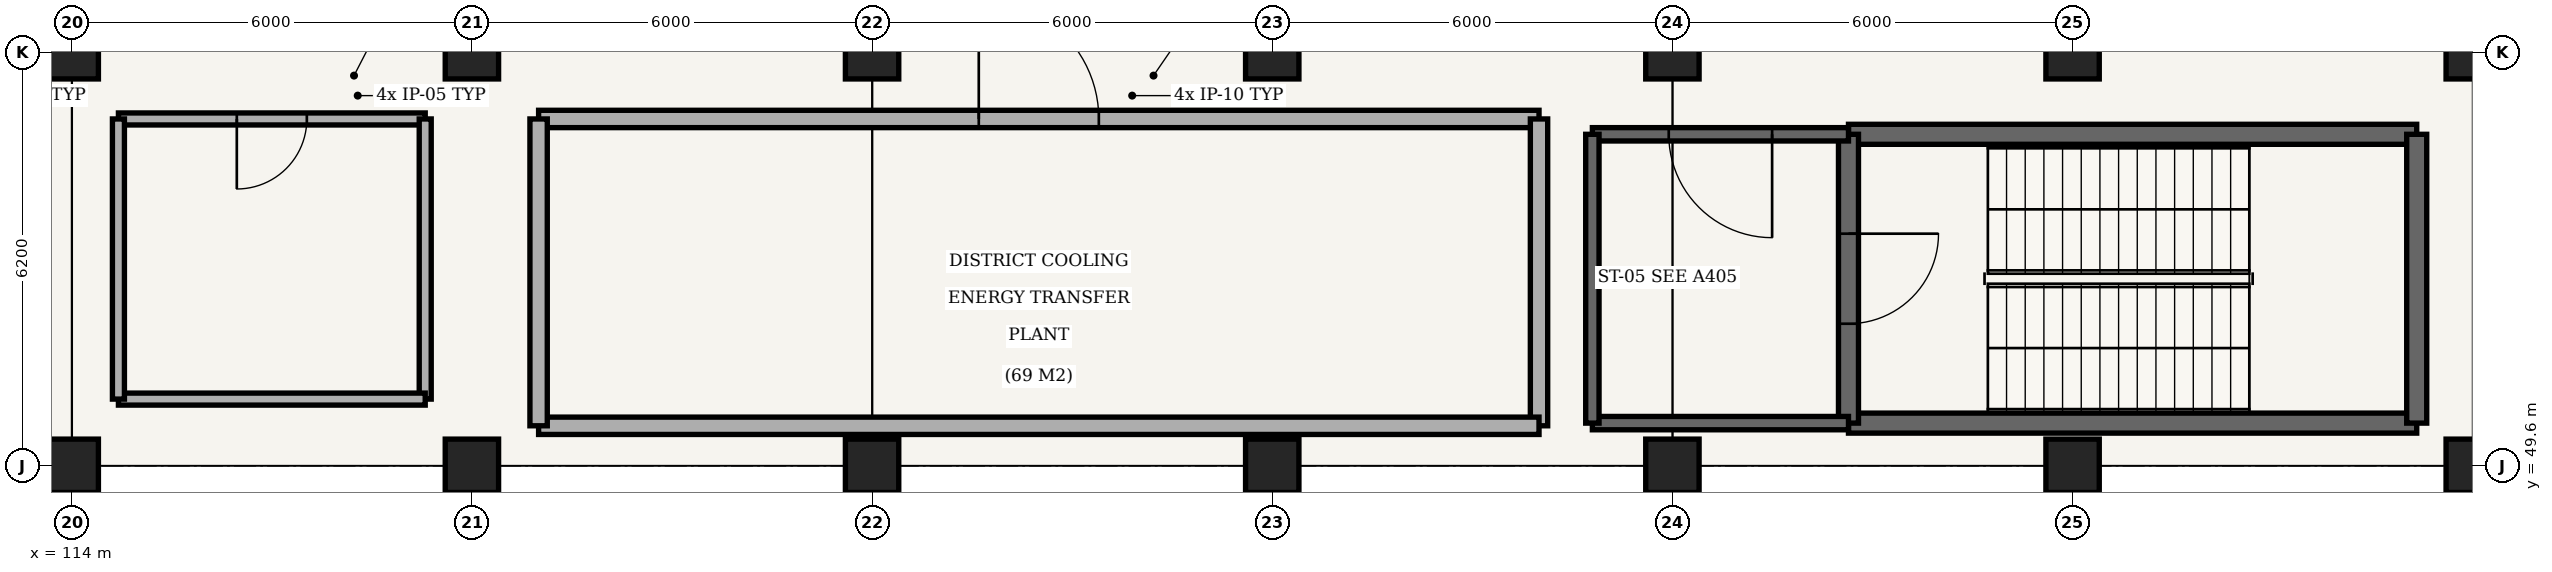
"""IFC4 building model, lengths in metres.
Left out: names, types, materials, properties, quantities, classifications, styles, units other than length and angle.
Written with IfcOpenShell. Run it as: python <this file> out.ifc"""

import sys

from ifc_helpers import new_model, si_unit, direction, frame, frame_2d, origin, origin_2d, place, context, subcontext, project, spatial, rectangle, hollow_circle, extrude, element, fill, save


model = new_model("IFC4")
c1 = context("Model", 3, precision=1e-05, world=origin(), true_north=direction((0.0, 1.0)))
c2 = subcontext(c1, "Body", "Model", "MODEL_VIEW")
j1 = project(units=[si_unit("LENGTHUNIT", "METRE"), si_unit("PLANEANGLEUNIT", "RADIAN")], contexts=[c1])
p1 = place(None, origin())
s1 = spatial("IfcSite", under=j1, at=p1, CompositionType="ELEMENT")
p2 = place(p1, origin())
s2 = spatial("IfcBuilding", under=s1, at=p2, CompositionType="ELEMENT")
p3 = place(p2, frame((0.0, 0.0, -5.4)))
s3 = spatial("IfcBuildingStorey", under=s2, at=p3, CompositionType="ELEMENT", Elevation=-5.4)
for number, where, z_axis, x_axis in (
    (1, (114.0, 49.6, -0.4), (0.0, 0.0, 1.0), (1.0, 0.0, 0.0)),
    (2, (114.0, 55.8, -0.4), (0.0, 0.0, 1.0), (1.0, 0.0, 0.0)),
    (3, (120.0, 49.6, -0.4), (0.0, 0.0, 1.0), (1.0, 0.0, 0.0)),
    (4, (120.0, 55.8, -0.4), (0.0, 0.0, 1.0), (1.0, 0.0, 0.0)),
    (5, (126.0, 49.6, -0.4), (0.0, 0.0, 1.0), (1.0, 0.0, 0.0)),
    (6, (126.0, 55.8, -0.4), (0.0, 0.0, 1.0), (1.0, 0.0, 0.0)),
    (7, (132.0, 49.6, -0.4), (0.0, 0.0, 1.0), (1.0, 0.0, 0.0)),
    (8, (132.0, 55.8, -0.4), (0.0, 0.0, 1.0), (1.0, 0.0, 0.0)),
    (9, (138.0, 49.6, -0.4), (0.0, 0.0, 1.0), (1.0, 0.0, 0.0)),
    (10, (138.0, 55.8, -0.4), (0.0, 0.0, 1.0), (1.0, 0.0, 0.0)),
    (11, (144.0, 49.6, -0.4), (0.0, 0.0, 1.0), (1.0, 0.0, 0.0)),
    (12, (144.0, 55.8, -0.4), (0.0, 0.0, 1.0), (1.0, 0.0, 0.0)),
    (13, (150.0, 49.6, -0.4), (0.0, 0.0, 1.0), (1.0, 0.0, 0.0)),
    (14, (150.0, 55.8, -0.4), (0.0, 0.0, 1.0), (1.0, 0.0, 0.0)),
):
    element("IfcColumn", number, at=place(p3, frame(where, z_axis=z_axis, x_axis=x_axis)), inside=s3, PredefinedType="COLUMN", context=c2, shape_type="SweptSolid", body=[
        extrude(rectangle(XDim=0.8, YDim=0.8, at=origin_2d()), origin(), (0.0, 0.0, 1.0), 5.8),
    ])
for number, where, z_axis, x_axis in (
    (15, (140.64, 50.24, -0.4), (0.0, 0.0, 1.0), (1.0, 0.0, 0.0)),
    (16, (149.16, 54.57, -0.4), (0.0, 0.0, 1.0), (-1.0, 0.0, 0.0)),
):
    element("IfcWall", number, at=place(p3, frame(where, z_axis=z_axis, x_axis=x_axis)), inside=s3, PredefinedType="SHEAR", context=c2, shape_type="SweptSolid", body=[
        extrude(rectangle(XDim=8.52, YDim=0.3, at=frame_2d((4.26, 0.0))), origin(), (0.0, 0.0, 1.0), 5.5),
    ])
p4 = place(p3, frame((140.64, 54.57, -0.4), z_axis=(0.0, 0.0, 1.0), x_axis=(0.0, -1.0, 0.0)))
e17 = element("IfcWall", 17, at=p4, inside=s3, PredefinedType="SHEAR", context=c2, shape_type="SweptSolid", body=[
    extrude(rectangle(XDim=4.33, YDim=0.3, at=frame_2d((2.165, 0.0))), origin(), (0.0, 0.0, 1.0), 5.5),
])
p5 = place(p4, frame((1.49, 0.0, 0.4)))
e18 = element("IfcOpeningElement", 18, at=p5, cuts=e17, PredefinedType="OPENING", context=c2, shape_type="SweptSolid", body=[
    extrude(rectangle(XDim=1.35, YDim=2.2, at=frame_2d((0.675, 1.1))), frame((0.0, 0.16, 0.0), z_axis=(0.0, -1.0, 0.0), x_axis=(1.0, 0.0, 0.0)), (0.0, 0.0, 1.0), 0.32),
])
p6 = place(p3, frame((149.16, 50.24, -0.4), z_axis=(0.0, 0.0, 1.0), x_axis=(0.0, 1.0, 0.0)))
e19 = element("IfcWall", 19, at=p6, inside=s3, PredefinedType="SHEAR", context=c2, shape_type="SweptSolid", body=[
    extrude(rectangle(XDim=4.33, YDim=0.3, at=frame_2d((2.165, 0.0))), origin(), (0.0, 0.0, 1.0), 5.5),
])
p7 = place(p3, frame((136.8, 50.24, 0.0), z_axis=(0.0, 0.0, 1.0), x_axis=(1.0, 0.0, 0.0)))
e20 = element("IfcWall", 20, at=p7, inside=s3, PredefinedType="SHEAR", context=c2, shape_type="SweptSolid", body=[
    extrude(rectangle(XDim=3.84, YDim=0.2, at=frame_2d((1.92, 0.0))), origin(), (0.0, 0.0, 1.0), 5.1),
])
p8 = place(p3, frame((140.64, 54.57, 0.0), z_axis=(0.0, 0.0, 1.0), x_axis=(-1.0, 0.0, 0.0)))
e21 = element("IfcWall", 21, at=p8, inside=s3, PredefinedType="SHEAR", context=c2, shape_type="SweptSolid", body=[
    extrude(rectangle(XDim=3.84, YDim=0.2, at=frame_2d((1.92, 0.0))), origin(), (0.0, 0.0, 1.0), 5.1),
])
p9 = place(p8, frame((1.145, 0.0, 0.0)))
e22 = element("IfcOpeningElement", 22, at=p9, cuts=e21, PredefinedType="OPENING", context=c2, shape_type="SweptSolid", body=[
    extrude(rectangle(XDim=1.55, YDim=2.2, at=frame_2d((0.775, 1.1))), frame((0.0, 0.11, 0.0), z_axis=(0.0, -1.0, 0.0), x_axis=(1.0, 0.0, 0.0)), (0.0, 0.0, 1.0), 0.22),
])
p10 = place(p3, frame((136.8, 54.57, 0.0), z_axis=(0.0, 0.0, 1.0), x_axis=(0.0, -1.0, 0.0)))
e23 = element("IfcWall", 23, at=p10, inside=s3, PredefinedType="SHEAR", context=c2, shape_type="SweptSolid", body=[
    extrude(rectangle(XDim=4.33, YDim=0.2, at=frame_2d((2.165, 0.0))), origin(), (0.0, 0.0, 1.0), 5.1),
])
p11 = place(p2, origin())
s4 = spatial("IfcBuildingStorey", under=s2, at=p11, CompositionType="ELEMENT", Elevation=0.0)
for number, where, z_axis, x_axis in (
    (24, (116.125, 55.35, -5.8), (0.0, 0.0, 1.0), (1.0, 0.0, 0.0)),
    (25, (117.875, 55.35, -5.8), (0.0, 0.0, 1.0), (1.0, 0.0, 0.0)),
):
    element("IfcColumn", number, at=place(p11, frame(where, z_axis=z_axis, x_axis=x_axis)), inside=s4, PredefinedType="COLUMN", context=c2, shape_type="SweptSolid", body=[
        extrude(hollow_circle(Radius=0.11, WallThickness=0.01, at=origin_2d()), origin(), (0.0, 0.0, 1.0), 8.3),
    ])
p12 = place(p3, frame((114.7, 54.8, 0.0), z_axis=(0.0, 0.0, 1.0), x_axis=(1.0, 0.0, 0.0)))
e26 = element("IfcWall", 26, at=p12, inside=s3, PredefinedType="PARTITIONING", context=c2, shape_type="SweptSolid", body=[
    extrude(rectangle(XDim=4.6, YDim=0.18, at=frame_2d((2.3, 0.0))), origin(), (0.0, 0.0, 1.0), 4.0),
])
p13 = place(p12, frame((1.775, 0.0, 0.0)))
e27 = element("IfcOpeningElement", 27, at=p13, cuts=e26, PredefinedType="OPENING", context=c2, shape_type="SweptSolid", body=[
    extrude(rectangle(XDim=1.05, YDim=2.1, at=frame_2d((0.525, 1.05))), frame((0.0, 0.1, 0.0), z_axis=(0.0, -1.0, 0.0), x_axis=(1.0, 0.0, 0.0)), (0.0, 0.0, 1.0), 0.2),
])
p14 = place(p3, frame((119.3, 54.8, 0.0), z_axis=(0.0, 0.0, 1.0), x_axis=(0.0, -1.0, 0.0)))
e28 = element("IfcWall", 28, at=p14, inside=s3, PredefinedType="PARTITIONING", context=c2, shape_type="SweptSolid", body=[
    extrude(rectangle(XDim=4.2, YDim=0.18, at=frame_2d((2.1, 0.0))), origin(), (0.0, 0.0, 1.0), 4.0),
])
p15 = place(p3, frame((119.3, 50.6, 0.0), z_axis=(0.0, 0.0, 1.0), x_axis=(-1.0, 0.0, 0.0)))
e29 = element("IfcWall", 29, at=p15, inside=s3, PredefinedType="PARTITIONING", context=c2, shape_type="SweptSolid", body=[
    extrude(rectangle(XDim=4.6, YDim=0.18, at=frame_2d((2.3, 0.0))), origin(), (0.0, 0.0, 1.0), 4.0),
])
p16 = place(p3, frame((114.7, 50.6, 0.0), z_axis=(0.0, 0.0, 1.0), x_axis=(0.0, 1.0, 0.0)))
e30 = element("IfcWall", 30, at=p16, inside=s3, PredefinedType="PARTITIONING", context=c2, shape_type="SweptSolid", body=[
    extrude(rectangle(XDim=4.2, YDim=0.18, at=frame_2d((2.1, 0.0))), origin(), (0.0, 0.0, 1.0), 4.0),
])
p17 = place(p3, frame((121.0, 54.8, 0.0), z_axis=(0.0, 0.0, 1.0), x_axis=(1.0, 0.0, 0.0)))
e31 = element("IfcWall", 31, at=p17, inside=s3, PredefinedType="PARTITIONING", context=c2, shape_type="SweptSolid", body=[
    extrude(rectangle(XDim=15.0, YDim=0.26, at=frame_2d((7.5, 0.0))), origin(), (0.0, 0.0, 1.0), 4.0),
])
p18 = place(p17, frame((6.6, 0.0, 0.0)))
e32 = element("IfcOpeningElement", 32, at=p18, cuts=e31, PredefinedType="OPENING", context=c2, shape_type="SweptSolid", body=[
    extrude(rectangle(XDim=1.8, YDim=2.1, at=frame_2d((0.9, 1.05))), frame((0.0, 0.14, 0.0), z_axis=(0.0, -1.0, 0.0), x_axis=(1.0, 0.0, 0.0)), (0.0, 0.0, 1.0), 0.28),
])
p19 = place(p3, frame((136.0, 54.8, 0.0), z_axis=(0.0, 0.0, 1.0), x_axis=(0.0, -1.0, 0.0)))
e33 = element("IfcWall", 33, at=p19, inside=s3, PredefinedType="PARTITIONING", context=c2, shape_type="SweptSolid", body=[
    extrude(rectangle(XDim=4.6, YDim=0.26, at=frame_2d((2.3, 0.0))), origin(), (0.0, 0.0, 1.0), 4.0),
])
p20 = place(p3, frame((136.0, 50.2, 0.0), z_axis=(0.0, 0.0, 1.0), x_axis=(-1.0, 0.0, 0.0)))
e34 = element("IfcWall", 34, at=p20, inside=s3, PredefinedType="PARTITIONING", context=c2, shape_type="SweptSolid", body=[
    extrude(rectangle(XDim=15.0, YDim=0.26, at=frame_2d((7.5, 0.0))), origin(), (0.0, 0.0, 1.0), 4.0),
])
p21 = place(p3, frame((121.0, 50.2, 0.0), z_axis=(0.0, 0.0, 1.0), x_axis=(0.0, 1.0, 0.0)))
e35 = element("IfcWall", 35, at=p21, inside=s3, PredefinedType="PARTITIONING", context=c2, shape_type="SweptSolid", body=[
    extrude(rectangle(XDim=4.6, YDim=0.26, at=frame_2d((2.3, 0.0))), origin(), (0.0, 0.0, 1.0), 4.0),
])
p22 = place(p5, origin())
e36 = element("IfcDoor", 36, at=p22, inside=s3, OperationType="SINGLE_SWING_LEFT", PredefinedType="DOOR", context=c2, shape_type="SweptSolid", body=[
    extrude(rectangle(XDim=1.35, YDim=2.2, at=frame_2d((0.675, 1.1))), frame((0.0, 0.025, 0.0), z_axis=(0.0, -1.0, 0.0), x_axis=(1.0, 0.0, 0.0)), (0.0, 0.0, 1.0), 0.05),
])
fill(e18, e36)
p23 = place(p9, origin())
e37 = element("IfcDoor", 37, at=p23, inside=s3, OperationType="SINGLE_SWING_LEFT", PredefinedType="DOOR", context=c2, shape_type="SweptSolid", body=[
    extrude(rectangle(XDim=1.55, YDim=2.2, at=frame_2d((0.775, 1.1))), frame((0.0, 0.025, 0.0), z_axis=(0.0, -1.0, 0.0), x_axis=(1.0, 0.0, 0.0)), (0.0, 0.0, 1.0), 0.05),
])
fill(e22, e37)
p24 = place(p13, origin())
e38 = element("IfcDoor", 38, at=p24, inside=s3, OperationType="SINGLE_SWING_RIGHT", PredefinedType="DOOR", context=c2, shape_type="SweptSolid", body=[
    extrude(rectangle(XDim=1.05, YDim=2.1, at=frame_2d((0.525, 1.05))), frame((0.0, 0.025, 0.0), z_axis=(0.0, -1.0, 0.0), x_axis=(1.0, 0.0, 0.0)), (0.0, 0.0, 1.0), 0.05),
])
fill(e27, e38)
p25 = place(p18, origin())
e39 = element("IfcDoor", 39, at=p25, inside=s3, OperationType="DOUBLE_DOOR_SINGLE_SWING", PredefinedType="DOOR", context=c2, shape_type="SweptSolid", body=[
    extrude(rectangle(XDim=1.8, YDim=2.1, at=frame_2d((0.9, 1.05))), frame((0.0, 0.025, 0.0), z_axis=(0.0, -1.0, 0.0), x_axis=(1.0, 0.0, 0.0)), (0.0, 0.0, 1.0), 0.05),
])
fill(e32, e39)
save(model, sys.argv[1])
